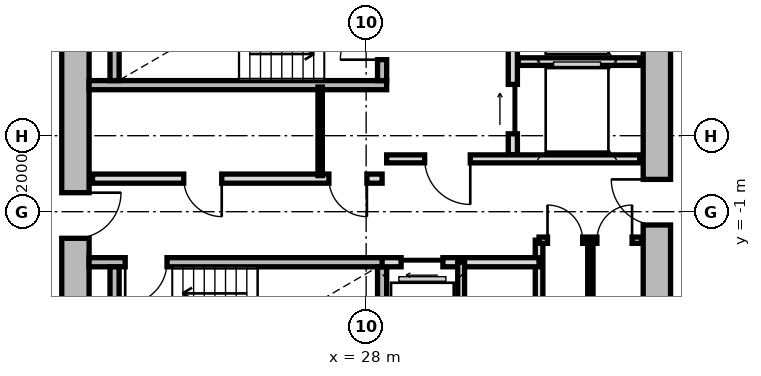
"""IFC4 building model, lengths in metres.
Left out: names, types, materials, properties, quantities, classifications, styles, units other than length and angle.
Written with IfcOpenShell. Run it as: python <this file> out.ifc"""

import sys

from ifc_helpers import new_model, si_unit, direction, frame, frame_2d, origin, place, context, subcontext, project, spatial, rectangle, extrude, source, transform, mapped, element, fill, save


model = new_model("IFC4")
c1 = context("Model", 3, precision=1e-05, world=origin(), true_north=direction((0.0, 1.0)))
c2 = subcontext(c1, "Body", "Model", "MODEL_VIEW")
j1 = project(units=[si_unit("LENGTHUNIT", "METRE"), si_unit("PLANEANGLEUNIT", "RADIAN")], contexts=[c1])
p1 = place(None, origin())
s1 = spatial("IfcSite", under=j1, at=p1, CompositionType="ELEMENT")
p2 = place(p1, origin())
s2 = spatial("IfcBuilding", under=s1, at=p2, CompositionType="ELEMENT")
p3 = place(p2, frame((0.0, 0.0, 126.75)))
s3 = spatial("IfcBuildingStorey", under=s2, at=p3, CompositionType="ELEMENT", Elevation=126.75)
m1 = source(origin(), c2, "Body", "SweptSolid", [
    extrude(rectangle(XDim=11.0, YDim=0.72, at=frame_2d((5.5, 0.0))), origin(), (0.0, 0.0, 1.0), 2.73),
])
p4 = place(p3, frame((20.35, -5.5, 0.0), z_axis=(0.0, 0.0, 1.0), x_axis=(0.0, 1.0, 0.0)))
e1 = element("IfcWall", 1, at=p4, inside=s3, PredefinedType="SHEAR", context=c2, shape_type="MappedRepresentation", body=[
    mapped(m1, transform((0.0, 0.0, 0.0), x_axis=(1.0, 0.0, 0.0), y_axis=(0.0, 1.0, 0.0), z_axis=(0.0, 0.0, 1.0), scale=1.0)),
])
p5 = place(p4, frame((3.8, 0.0, 0.0)))
e2 = element("IfcOpeningElement", 2, at=p5, cuts=e1, PredefinedType="OPENING", context=c2, shape_type="SweptSolid", body=[
    extrude(rectangle(XDim=1.2, YDim=2.15, at=frame_2d((0.6, 1.075))), frame((0.0, 0.37, 0.0), z_axis=(0.0, -1.0, 0.0), x_axis=(1.0, 0.0, 0.0)), (0.0, 0.0, 1.0), 0.74),
])
p6 = place(p3, frame((35.65, 5.5, 0.0), z_axis=(0.0, 0.0, 1.0), x_axis=(0.0, -1.0, 0.0)))
e3 = element("IfcWall", 3, at=p6, inside=s3, PredefinedType="SHEAR", context=c2, shape_type="MappedRepresentation", body=[
    mapped(m1, transform((0.0, 0.0, 0.0), x_axis=(1.0, 0.0, 0.0), y_axis=(0.0, 1.0, 0.0), z_axis=(0.0, 0.0, 1.0), scale=1.0)),
])
p7 = place(p6, frame((5.65, 0.0, 0.0)))
e4 = element("IfcOpeningElement", 4, at=p7, cuts=e3, PredefinedType="OPENING", context=c2, shape_type="SweptSolid", body=[
    extrude(rectangle(XDim=1.2, YDim=2.15, at=frame_2d((0.6, 1.075))), frame((0.0, 0.37, 0.0), z_axis=(0.0, -1.0, 0.0), x_axis=(1.0, 0.0, 0.0)), (0.0, 0.0, 1.0), 0.74),
])
m2 = source(origin(), c2, "Body", "SweptSolid", [
    extrude(rectangle(XDim=7.83, YDim=0.24, at=frame_2d((3.915, 0.0))), origin(), (0.0, 0.0, 1.0), 2.73),
])
p8 = place(p3, frame((20.71, 2.33, 0.0), z_axis=(0.0, 0.0, 1.0), x_axis=(1.0, 0.0, 0.0)))
e5 = element("IfcWall", 5, at=p8, inside=s3, PredefinedType="PARTITIONING", context=c2, shape_type="MappedRepresentation", body=[
    mapped(m2, transform((0.0, 0.0, 0.0), x_axis=(1.0, 0.0, 0.0), y_axis=(0.0, 1.0, 0.0), z_axis=(0.0, 0.0, 1.0), scale=1.0)),
])
m3 = source(origin(), c2, "Body", "SweptSolid", [
    extrude(rectangle(XDim=3.14, YDim=0.24, at=frame_2d((1.57, 0.0))), origin(), (0.0, 0.0, 1.0), 2.73),
])
p9 = place(p3, frame((21.38, 2.45, 0.0), z_axis=(0.0, 0.0, 1.0), x_axis=(0.0, 1.0, 0.0)))
e6 = element("IfcWall", 6, at=p9, inside=s3, PredefinedType="PARTITIONING", context=c2, shape_type="MappedRepresentation", body=[
    mapped(m3, transform((0.0, 0.0, 0.0), x_axis=(1.0, 0.0, 0.0), y_axis=(0.0, 1.0, 0.0), z_axis=(0.0, 0.0, 1.0), scale=1.0)),
])
p10 = place(p3, frame((28.42, 2.45, 0.0), z_axis=(0.0, 0.0, 1.0), x_axis=(0.0, 1.0, 0.0)))
e7 = element("IfcWall", 7, at=p10, inside=s3, PredefinedType="PARTITIONING", context=c2, shape_type="MappedRepresentation", body=[
    mapped(m3, transform((0.0, 0.0, 0.0), x_axis=(1.0, 0.0, 0.0), y_axis=(0.0, 1.0, 0.0), z_axis=(0.0, 0.0, 1.0), scale=1.0)),
])
p11 = place(p10, frame((0.55, 0.0, 0.0)))
e8 = element("IfcOpeningElement", 8, at=p11, cuts=e7, PredefinedType="OPENING", context=c2, shape_type="SweptSolid", body=[
    extrude(rectangle(XDim=1.1, YDim=2.15, at=frame_2d((0.55, 1.075))), frame((0.0, 0.13, 0.0), z_axis=(0.0, -1.0, 0.0), x_axis=(1.0, 0.0, 0.0)), (0.0, 0.0, 1.0), 0.26),
])
p12 = place(p3, frame((20.71, -2.33, 0.0), z_axis=(0.0, 0.0, 1.0), x_axis=(1.0, 0.0, 0.0)))
e9 = element("IfcWall", 9, at=p12, inside=s3, PredefinedType="PARTITIONING", context=c2, shape_type="MappedRepresentation", body=[
    mapped(m2, transform((0.0, 0.0, 0.0), x_axis=(1.0, 0.0, 0.0), y_axis=(0.0, 1.0, 0.0), z_axis=(0.0, 0.0, 1.0), scale=1.0)),
])
p13 = place(p12, frame((0.95, 0.0, 0.0)))
e10 = element("IfcOpeningElement", 10, at=p13, cuts=e9, PredefinedType="OPENING", context=c2, shape_type="SweptSolid", body=[
    extrude(rectangle(XDim=1.1, YDim=2.15, at=frame_2d((0.55, 1.075))), frame((0.0, 0.13, 0.0), z_axis=(0.0, -1.0, 0.0), x_axis=(1.0, 0.0, 0.0)), (0.0, 0.0, 1.0), 0.26),
])
for number, where, z_axis, x_axis in (
    (11, (21.38, -5.59, 0.0), (0.0, 0.0, 1.0), (0.0, 1.0, 0.0)),
    (12, (28.42, -5.59, 0.0), (0.0, 0.0, 1.0), (0.0, 1.0, 0.0)),
):
    element("IfcWall", number, at=place(p3, frame(where, z_axis=z_axis, x_axis=x_axis)), inside=s3, PredefinedType="PARTITIONING", context=c2, shape_type="MappedRepresentation", body=[
        mapped(m3, transform((0.0, 0.0, 0.0), x_axis=(1.0, 0.0, 0.0), y_axis=(0.0, 1.0, 0.0), z_axis=(0.0, 0.0, 1.0), scale=1.0)),
    ])
m4 = source(origin(), c2, "Body", "SweptSolid", [
    extrude(rectangle(XDim=5.0, YDim=0.24, at=frame_2d((2.5, 0.0))), origin(), (0.0, 0.0, 1.0), 2.715),
])
p14 = place(p3, frame((31.86, 0.5, 0.0), z_axis=(0.0, 0.0, 1.0), x_axis=(0.0, 1.0, 0.0)))
e13 = element("IfcWall", 13, at=p14, inside=s3, PredefinedType="PARTITIONING", context=c2, shape_type="MappedRepresentation", body=[
    mapped(m4, transform((0.0, 0.0, 0.0), x_axis=(1.0, 0.0, 0.0), y_axis=(0.0, 1.0, 0.0), z_axis=(0.0, 0.0, 1.0), scale=1.0)),
])
p15 = place(p14, frame((3.05, 0.0, 0.0)))
e14 = element("IfcOpeningElement", 14, at=p15, cuts=e13, PredefinedType="OPENING", context=c2, shape_type="SweptSolid", body=[
    extrude(rectangle(XDim=1.3, YDim=2.2, at=frame_2d((0.65, 1.1))), frame((0.0, 0.13, 0.0), z_axis=(0.0, -1.0, 0.0), x_axis=(1.0, 0.0, 0.0)), (0.0, 0.0, 1.0), 0.26),
])
p16 = place(p14, frame((0.55, 0.0, 0.0)))
e15 = element("IfcOpeningElement", 15, at=p16, cuts=e13, PredefinedType="OPENING", context=c2, shape_type="SweptSolid", body=[
    extrude(rectangle(XDim=1.3, YDim=2.2, at=frame_2d((0.65, 1.1))), frame((0.0, 0.13, 0.0), z_axis=(0.0, -1.0, 0.0), x_axis=(1.0, 0.0, 0.0)), (0.0, 0.0, 1.0), 0.26),
])
m5 = source(origin(), c2, "Body", "SweptSolid", [
    extrude(rectangle(XDim=3.2, YDim=0.2, at=frame_2d((1.6, 0.0))), origin(), (0.0, 0.0, 1.0), 2.715),
])
p17 = place(p3, frame((32.0, 2.95, 0.0), z_axis=(0.0, 0.0, 1.0), x_axis=(1.0, 0.0, 0.0)))
e16 = element("IfcWall", 16, at=p17, inside=s3, PredefinedType="PARTITIONING", context=c2, shape_type="MappedRepresentation", body=[
    mapped(m5, transform((0.0, 0.0, 0.0), x_axis=(1.0, 0.0, 0.0), y_axis=(0.0, 1.0, 0.0), z_axis=(0.0, 0.0, 1.0), scale=1.0)),
])
m6 = source(origin(), c2, "Body", "SweptSolid", [
    extrude(rectangle(XDim=6.66, YDim=0.21, at=frame_2d((3.33, 0.0))), origin(), (0.0, 0.0, 1.0), 2.715),
])
p18 = place(p3, frame((28.54, 0.39, 0.0), z_axis=(0.0, 0.0, 1.0), x_axis=(1.0, 0.0, 0.0)))
e17 = element("IfcWall", 17, at=p18, inside=s3, PredefinedType="PARTITIONING", context=c2, shape_type="MappedRepresentation", body=[
    mapped(m6, transform((0.0, 0.0, 0.0), x_axis=(1.0, 0.0, 0.0), y_axis=(0.0, 1.0, 0.0), z_axis=(0.0, 0.0, 1.0), scale=1.0)),
])
p19 = place(p18, frame((1.0, 0.0, 0.0)))
e18 = element("IfcOpeningElement", 18, at=p19, cuts=e17, PredefinedType="OPENING", context=c2, shape_type="SweptSolid", body=[
    extrude(rectangle(XDim=1.2, YDim=2.15, at=frame_2d((0.6, 1.075))), frame((0.0, 0.115, 0.0), z_axis=(0.0, -1.0, 0.0), x_axis=(1.0, 0.0, 0.0)), (0.0, 0.0, 1.0), 0.23),
])
m7 = source(origin(), c2, "Body", "SweptSolid", [
    extrude(rectangle(XDim=7.62, YDim=0.24, at=frame_2d((3.81, 0.0))), origin(), (0.0, 0.0, 1.0), 2.715),
])
p20 = place(p3, frame((20.8, -0.13, 0.0), z_axis=(0.0, 0.0, 1.0), x_axis=(1.0, 0.0, 0.0)))
e19 = element("IfcWall", 19, at=p20, inside=s3, PredefinedType="PARTITIONING", context=c2, shape_type="MappedRepresentation", body=[
    mapped(m7, transform((0.0, 0.0, 0.0), x_axis=(1.0, 0.0, 0.0), y_axis=(0.0, 1.0, 0.0), z_axis=(0.0, 0.0, 1.0), scale=1.0)),
])
p21 = place(p20, frame((6.22, 0.0, 0.0)))
e20 = element("IfcOpeningElement", 20, at=p21, cuts=e19, PredefinedType="OPENING", context=c2, shape_type="SweptSolid", body=[
    extrude(rectangle(XDim=1.0, YDim=2.1, at=frame_2d((0.5, 1.05))), frame((0.0, 0.13, 0.0), z_axis=(0.0, -1.0, 0.0), x_axis=(1.0, 0.0, 0.0)), (0.0, 0.0, 1.0), 0.26),
])
p22 = place(p20, frame((2.4, 0.0, 0.0)))
e21 = element("IfcOpeningElement", 21, at=p22, cuts=e19, PredefinedType="OPENING", context=c2, shape_type="SweptSolid", body=[
    extrude(rectangle(XDim=1.0, YDim=2.1, at=frame_2d((0.5, 1.05))), frame((0.0, 0.13, 0.0), z_axis=(0.0, -1.0, 0.0), x_axis=(1.0, 0.0, 0.0)), (0.0, 0.0, 1.0), 0.26),
])
m8 = source(origin(), c2, "Body", "SweptSolid", [
    extrude(rectangle(XDim=2.33, YDim=0.115, at=frame_2d((1.165, 0.0))), origin(), (0.0, 0.0, 1.0), 2.715),
])
p23 = place(p3, frame((26.79, -0.05, 0.0), z_axis=(0.0, 0.0, 1.0), x_axis=(0.0, 1.0, 0.0)))
e22 = element("IfcWall", 22, at=p23, inside=s3, PredefinedType="PARTITIONING", context=c2, shape_type="MappedRepresentation", body=[
    mapped(m8, transform((0.0, 0.0, 0.0), x_axis=(1.0, 0.0, 0.0), y_axis=(0.0, 1.0, 0.0), z_axis=(0.0, 0.0, 1.0), scale=1.0)),
])
m9 = source(origin(), c2, "Body", "SweptSolid", [
    extrude(rectangle(XDim=3.8, YDim=0.2, at=frame_2d((1.9, 0.0))), origin(), (0.0, 0.0, 1.0), 2.715),
])
p24 = place(p3, frame((32.55, -5.55, 0.0), z_axis=(0.0, 0.0, 1.0), x_axis=(0.0, 1.0, 0.0)))
e23 = element("IfcWall", 23, at=p24, inside=s3, PredefinedType="PARTITIONING", context=c2, shape_type="MappedRepresentation", body=[
    mapped(m9, transform((0.0, 0.0, 0.0), x_axis=(1.0, 0.0, 0.0), y_axis=(0.0, 1.0, 0.0), z_axis=(0.0, 0.0, 1.0), scale=1.0)),
])
m10 = source(origin(), c2, "Body", "SweptSolid", [
    extrude(rectangle(XDim=4.13, YDim=0.24, at=frame_2d((2.065, 0.0))), origin(), (0.0, 0.0, 1.0), 2.715),
])
p25 = place(p3, frame((28.42, -2.33, 0.0), z_axis=(0.0, 0.0, 1.0), x_axis=(1.0, 0.0, 0.0)))
e24 = element("IfcWall", 24, at=p25, inside=s3, PredefinedType="PARTITIONING", context=c2, shape_type="MappedRepresentation", body=[
    mapped(m10, transform((0.0, 0.0, 0.0), x_axis=(1.0, 0.0, 0.0), y_axis=(0.0, 1.0, 0.0), z_axis=(0.0, 0.0, 1.0), scale=1.0)),
])
p26 = place(p25, frame((0.5, 0.0, 0.0)))
e25 = element("IfcOpeningElement", 25, at=p26, cuts=e24, PredefinedType="OPENING", context=c2, shape_type="SweptSolid", body=[
    extrude(rectangle(XDim=1.1, YDim=2.2, at=frame_2d((0.55, 1.1))), frame((0.0, 0.13, 0.0), z_axis=(0.0, -1.0, 0.0), x_axis=(1.0, 0.0, 0.0)), (0.0, 0.0, 1.0), 0.26),
])
m11 = source(origin(), c2, "Body", "SweptSolid", [
    extrude(rectangle(XDim=3.22, YDim=0.18, at=frame_2d((1.61, 0.0))), origin(), (0.0, 0.0, 1.0), 2.715),
])
p27 = place(p3, frame((30.5, -5.55, 0.0), z_axis=(0.0, 0.0, 1.0), x_axis=(0.0, 1.0, 0.0)))
e26 = element("IfcWall", 26, at=p27, inside=s3, PredefinedType="PARTITIONING", context=c2, shape_type="MappedRepresentation", body=[
    mapped(m11, transform((0.0, 0.0, 0.0), x_axis=(1.0, 0.0, 0.0), y_axis=(0.0, 1.0, 0.0), z_axis=(0.0, 0.0, 1.0), scale=1.0)),
])
m12 = source(origin(), c2, "Body", "SweptSolid", [
    extrude(rectangle(XDim=2.7, YDim=0.165, at=frame_2d((1.35, 0.0))), origin(), (0.0, 0.0, 1.0), 2.715),
])
p28 = place(p3, frame((32.55, -1.75, 0.0), z_axis=(0.0, 0.0, 1.0), x_axis=(1.0, 0.0, 0.0)))
e27 = element("IfcWall", 27, at=p28, inside=s3, PredefinedType="PARTITIONING", context=c2, shape_type="MappedRepresentation", body=[
    mapped(m12, transform((0.0, 0.0, 0.0), x_axis=(1.0, 0.0, 0.0), y_axis=(0.0, 1.0, 0.0), z_axis=(0.0, 0.0, 1.0), scale=1.0)),
])
p29 = place(p28, frame((0.222, 0.0, 0.0)))
e28 = element("IfcOpeningElement", 28, at=p29, cuts=e27, PredefinedType="OPENING", context=c2, shape_type="SweptSolid", body=[
    extrude(rectangle(XDim=0.925, YDim=2.1, at=frame_2d((0.462, 1.05))), frame((0.0, 0.093, 0.0), z_axis=(0.0, -1.0, 0.0), x_axis=(1.0, 0.0, 0.0)), (0.0, 0.0, 1.0), 0.185),
])
p30 = place(p28, frame((1.522, 0.0, 0.0)))
e29 = element("IfcOpeningElement", 29, at=p30, cuts=e27, PredefinedType="OPENING", context=c2, shape_type="SweptSolid", body=[
    extrude(rectangle(XDim=0.925, YDim=2.1, at=frame_2d((0.462, 1.05))), frame((0.0, 0.093, 0.0), z_axis=(0.0, -1.0, 0.0), x_axis=(1.0, 0.0, 0.0)), (0.0, 0.0, 1.0), 0.185),
])
m13 = source(origin(), c2, "Body", "SweptSolid", [
    extrude(rectangle(XDim=3.8, YDim=0.14, at=frame_2d((1.9, 0.0))), origin(), (0.0, 0.0, 1.0), 2.715),
])
p31 = place(p3, frame((33.9, -5.55, 0.0), z_axis=(0.0, 0.0, 1.0), x_axis=(0.0, 1.0, 0.0)))
e30 = element("IfcWall", 30, at=p31, inside=s3, PredefinedType="PARTITIONING", context=c2, shape_type="MappedRepresentation", body=[
    mapped(m13, transform((0.0, 0.0, 0.0), x_axis=(1.0, 0.0, 0.0), y_axis=(0.0, 1.0, 0.0), z_axis=(0.0, 0.0, 1.0), scale=1.0)),
])
m14 = source(origin(), c2, "Body", "SweptSolid", [
    extrude(rectangle(XDim=1.1, YDim=2.15, at=frame_2d((0.55, 1.075))), frame((0.0, 0.025, 0.0), z_axis=(0.0, -1.0, 0.0), x_axis=(1.0, 0.0, 0.0)), (0.0, 0.0, 1.0), 0.05),
])
p32 = place(p11, origin())
e31 = element("IfcDoor", 31, at=p32, inside=s3, OperationType="SINGLE_SWING_LEFT", PredefinedType="DOOR", context=c2, shape_type="MappedRepresentation", body=[
    mapped(m14, transform((0.0, 0.0, 0.0), x_axis=(1.0, 0.0, 0.0), y_axis=(0.0, 1.0, 0.0), z_axis=(0.0, 0.0, 1.0), scale=1.0)),
])
fill(e8, e31)
p33 = place(p13, frame((1.1, 0.0, 0.0), z_axis=(0.0, 0.0, 1.0), x_axis=(-1.0, 0.0, 0.0)))
e32 = element("IfcDoor", 32, at=p33, inside=s3, OperationType="SINGLE_SWING_RIGHT", PredefinedType="DOOR", context=c2, shape_type="MappedRepresentation", body=[
    mapped(m14, transform((0.0, 0.0, 0.0), x_axis=(1.0, 0.0, 0.0), y_axis=(0.0, 1.0, 0.0), z_axis=(0.0, 0.0, 1.0), scale=1.0)),
])
fill(e10, e32)
m15 = source(origin(), c2, "Body", "SweptSolid", [
    extrude(rectangle(XDim=1.3, YDim=2.2, at=frame_2d((0.65, 1.1))), frame((0.0, 0.025, 0.0), z_axis=(0.0, -1.0, 0.0), x_axis=(1.0, 0.0, 0.0)), (0.0, 0.0, 1.0), 0.05),
])
p34 = place(p16, origin())
e33 = element("IfcDoor", 33, at=p34, inside=s3, OperationType="SLIDING_TO_RIGHT", PredefinedType="DOOR", context=c2, shape_type="MappedRepresentation", body=[
    mapped(m15, transform((0.0, 0.0, 0.0), x_axis=(1.0, 0.0, 0.0), y_axis=(0.0, 1.0, 0.0), z_axis=(0.0, 0.0, 1.0), scale=1.0)),
])
fill(e15, e33)
m16 = source(origin(), c2, "Body", "SweptSolid", [
    extrude(rectangle(XDim=1.2, YDim=2.15, at=frame_2d((0.6, 1.075))), frame((0.0, 0.025, 0.0), z_axis=(0.0, -1.0, 0.0), x_axis=(1.0, 0.0, 0.0)), (0.0, 0.0, 1.0), 0.05),
])
p35 = place(p19, frame((1.2, 0.0, 0.0), z_axis=(0.0, 0.0, 1.0), x_axis=(-1.0, 0.0, 0.0)))
e34 = element("IfcDoor", 34, at=p35, inside=s3, OperationType="SINGLE_SWING_LEFT", PredefinedType="DOOR", context=c2, shape_type="MappedRepresentation", body=[
    mapped(m16, transform((0.0, 0.0, 0.0), x_axis=(1.0, 0.0, 0.0), y_axis=(0.0, 1.0, 0.0), z_axis=(0.0, 0.0, 1.0), scale=1.0)),
])
fill(e18, e34)
p36 = place(p5, frame((1.2, 0.0, 0.0), z_axis=(0.0, 0.0, 1.0), x_axis=(-1.0, 0.0, 0.0)))
e35 = element("IfcDoor", 35, at=p36, inside=s3, OperationType="SINGLE_SWING_LEFT", PredefinedType="DOOR", context=c2, shape_type="MappedRepresentation", body=[
    mapped(m16, transform((0.0, 0.0, 0.0), x_axis=(1.0, 0.0, 0.0), y_axis=(0.0, 1.0, 0.0), z_axis=(0.0, 0.0, 1.0), scale=1.0)),
])
fill(e2, e35)
p37 = place(p7, frame((1.2, 0.0, 0.0), z_axis=(0.0, 0.0, 1.0), x_axis=(-1.0, 0.0, 0.0)))
e36 = element("IfcDoor", 36, at=p37, inside=s3, OperationType="SINGLE_SWING_RIGHT", PredefinedType="DOOR", context=c2, shape_type="MappedRepresentation", body=[
    mapped(m16, transform((0.0, 0.0, 0.0), x_axis=(1.0, 0.0, 0.0), y_axis=(0.0, 1.0, 0.0), z_axis=(0.0, 0.0, 1.0), scale=1.0)),
])
fill(e4, e36)
m17 = source(origin(), c2, "Body", "SweptSolid", [
    extrude(rectangle(XDim=1.0, YDim=2.1, at=frame_2d((0.5, 1.05))), frame((0.0, 0.025, 0.0), z_axis=(0.0, -1.0, 0.0), x_axis=(1.0, 0.0, 0.0)), (0.0, 0.0, 1.0), 0.05),
])
p38 = place(p21, frame((1.0, 0.0, 0.0), z_axis=(0.0, 0.0, 1.0), x_axis=(-1.0, 0.0, 0.0)))
e37 = element("IfcDoor", 37, at=p38, inside=s3, OperationType="SINGLE_SWING_LEFT", PredefinedType="DOOR", context=c2, shape_type="MappedRepresentation", body=[
    mapped(m17, transform((0.0, 0.0, 0.0), x_axis=(1.0, 0.0, 0.0), y_axis=(0.0, 1.0, 0.0), z_axis=(0.0, 0.0, 1.0), scale=1.0)),
])
fill(e20, e37)
p39 = place(p22, frame((1.0, 0.0, 0.0), z_axis=(0.0, 0.0, 1.0), x_axis=(-1.0, 0.0, 0.0)))
e38 = element("IfcDoor", 38, at=p39, inside=s3, OperationType="SINGLE_SWING_LEFT", PredefinedType="DOOR", context=c2, shape_type="MappedRepresentation", body=[
    mapped(m17, transform((0.0, 0.0, 0.0), x_axis=(1.0, 0.0, 0.0), y_axis=(0.0, 1.0, 0.0), z_axis=(0.0, 0.0, 1.0), scale=1.0)),
])
fill(e21, e38)
m18 = source(origin(), c2, "Body", "SweptSolid", [
    extrude(rectangle(XDim=1.1, YDim=2.2, at=frame_2d((0.55, 1.1))), frame((0.0, 0.025, 0.0), z_axis=(0.0, -1.0, 0.0), x_axis=(1.0, 0.0, 0.0)), (0.0, 0.0, 1.0), 0.05),
])
p40 = place(p26, frame((1.1, 0.0, 0.0), z_axis=(0.0, 0.0, 1.0), x_axis=(-1.0, 0.0, 0.0)))
e39 = element("IfcDoor", 39, at=p40, inside=s3, OperationType="SLIDING_TO_LEFT", PredefinedType="DOOR", context=c2, shape_type="MappedRepresentation", body=[
    mapped(m18, transform((0.0, 0.0, 0.0), x_axis=(1.0, 0.0, 0.0), y_axis=(0.0, 1.0, 0.0), z_axis=(0.0, 0.0, 1.0), scale=1.0)),
])
fill(e25, e39)
m19 = source(origin(), c2, "Body", "SweptSolid", [
    extrude(rectangle(XDim=0.925, YDim=2.1, at=frame_2d((0.462, 1.05))), frame((0.0, 0.025, 0.0), z_axis=(0.0, -1.0, 0.0), x_axis=(1.0, 0.0, 0.0)), (0.0, 0.0, 1.0), 0.05),
])
p41 = place(p29, origin())
e40 = element("IfcDoor", 40, at=p41, inside=s3, OperationType="SINGLE_SWING_LEFT", PredefinedType="DOOR", context=c2, shape_type="MappedRepresentation", body=[
    mapped(m19, transform((0.0, 0.0, 0.0), x_axis=(1.0, 0.0, 0.0), y_axis=(0.0, 1.0, 0.0), z_axis=(0.0, 0.0, 1.0), scale=1.0)),
])
fill(e28, e40)
p42 = place(p30, origin())
e41 = element("IfcDoor", 41, at=p42, inside=s3, OperationType="SINGLE_SWING_RIGHT", PredefinedType="DOOR", context=c2, shape_type="MappedRepresentation", body=[
    mapped(m19, transform((0.0, 0.0, 0.0), x_axis=(1.0, 0.0, 0.0), y_axis=(0.0, 1.0, 0.0), z_axis=(0.0, 0.0, 1.0), scale=1.0)),
])
fill(e29, e41)
save(model, sys.argv[1])
